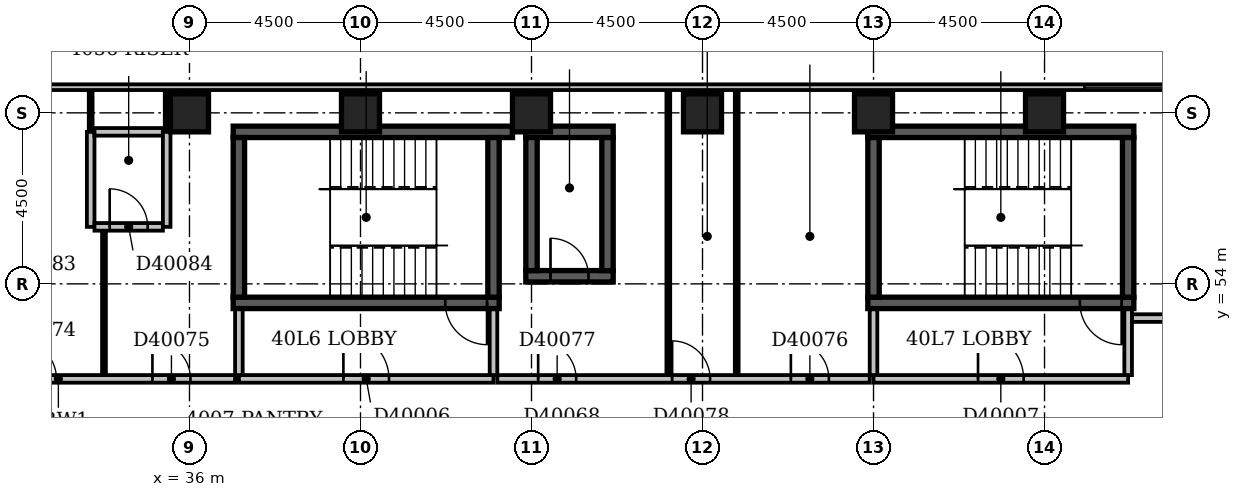
"""IFC4 building model, lengths in metres.
Left out: names, types, materials, properties, quantities, classifications, styles, units other than length and angle.
Written with IfcOpenShell. Run it as: python <this file> out.ifc"""

import sys

from ifc_helpers import new_model, si_unit, direction, frame, frame_2d, origin, origin_2d, place, context, subcontext, project, spatial, rectangle, extrude, element, fill, save


model = new_model("IFC4")
c1 = context("Model", 3, precision=1e-05, world=origin(), true_north=direction((0.0, 1.0)))
c2 = subcontext(c1, "Body", "Model", "MODEL_VIEW")
j1 = project(units=[si_unit("LENGTHUNIT", "METRE"), si_unit("PLANEANGLEUNIT", "RADIAN")], contexts=[c1])
p1 = place(None, origin())
s1 = spatial("IfcSite", under=j1, at=p1, CompositionType="ELEMENT")
p2 = place(p1, origin())
s2 = spatial("IfcBuilding", under=s1, at=p2, CompositionType="ELEMENT")
p3 = place(p2, frame((0.0, 0.0, 159.2)))
s3 = spatial("IfcBuildingStorey", under=s2, at=p3, CompositionType="ELEMENT", Elevation=159.2)
p4 = place(p3, frame((37.15, 53.5, -0.3), z_axis=(0.0, 0.0, 1.0), x_axis=(1.0, 0.0, 0.0)))
e1 = element("IfcWall", 1, at=p4, inside=s3, PredefinedType="SHEAR", context=c2, shape_type="SweptSolid", body=[
    extrude(rectangle(XDim=7.0, YDim=0.3, at=frame_2d((3.5, 0.0))), origin(), (0.0, 0.0, 1.0), 3.6),
])
p5 = place(p4, frame((5.58, 0.0, 0.3)))
e2 = element("IfcOpeningElement", 2, at=p5, cuts=e1, PredefinedType="OPENING", context=c2, shape_type="SweptSolid", body=[
    extrude(rectangle(XDim=1.1, YDim=2.1, at=frame_2d((0.55, 1.05))), frame((0.0, 0.162, 0.0), z_axis=(0.0, -1.0, 0.0), x_axis=(1.0, 0.0, 0.0)), (0.0, 0.0, 1.0), 0.324),
])
p6 = place(p3, frame((37.15, 58.0, -0.3), z_axis=(0.0, 0.0, 1.0), x_axis=(1.0, 0.0, 0.0)))
e3 = element("IfcWall", 3, at=p6, inside=s3, PredefinedType="SHEAR", context=c2, shape_type="SweptSolid", body=[
    extrude(rectangle(XDim=7.35, YDim=0.3, at=frame_2d((3.675, 0.0))), origin(), (0.0, 0.0, 1.0), 3.6),
])
for number, where, z_axis, x_axis in (
    (4, (37.3, 53.65, -0.3), (0.0, 0.0, 1.0), (0.0, 1.0, 0.0)),
    (5, (44.0, 53.65, -0.3), (0.0, 0.0, 1.0), (0.0, 1.0, 0.0)),
):
    element("IfcWall", number, at=place(p3, frame(where, z_axis=z_axis, x_axis=x_axis)), inside=s3, PredefinedType="SHEAR", context=c2, shape_type="SweptSolid", body=[
        extrude(rectangle(XDim=4.2, YDim=0.3, at=frame_2d((2.1, 0.0))), origin(), (0.0, 0.0, 1.0), 3.6),
    ])
p7 = place(p3, frame((44.85, 54.2, -0.3), z_axis=(0.0, 0.0, 1.0), x_axis=(1.0, 0.0, 0.0)))
e6 = element("IfcWall", 6, at=p7, inside=s3, PredefinedType="SHEAR", context=c2, shape_type="SweptSolid", body=[
    extrude(rectangle(XDim=2.3, YDim=0.3, at=frame_2d((1.15, 0.0))), origin(), (0.0, 0.0, 1.0), 3.6),
])
p8 = place(p7, frame((0.65, 0.0, 0.3)))
e7 = element("IfcOpeningElement", 7, at=p8, cuts=e6, PredefinedType="OPENING", context=c2, shape_type="SweptSolid", body=[
    extrude(rectangle(XDim=1.0, YDim=2.1, at=frame_2d((0.5, 1.05))), frame((0.0, 0.162, 0.0), z_axis=(0.0, -1.0, 0.0), x_axis=(1.0, 0.0, 0.0)), (0.0, 0.0, 1.0), 0.324),
])
p9 = place(p3, frame((44.85, 58.0, -0.3), z_axis=(0.0, 0.0, 1.0), x_axis=(1.0, 0.0, 0.0)))
e8 = element("IfcWall", 8, at=p9, inside=s3, PredefinedType="SHEAR", context=c2, shape_type="SweptSolid", body=[
    extrude(rectangle(XDim=2.3, YDim=0.3, at=frame_2d((1.15, 0.0))), origin(), (0.0, 0.0, 1.0), 3.6),
])
for number, where, z_axis, x_axis in (
    (9, (45.0, 54.35, -0.3), (0.0, 0.0, 1.0), (0.0, 1.0, 0.0)),
    (10, (47.0, 54.35, -0.3), (0.0, 0.0, 1.0), (0.0, 1.0, 0.0)),
):
    element("IfcWall", number, at=place(p3, frame(where, z_axis=z_axis, x_axis=x_axis)), inside=s3, PredefinedType="SHEAR", context=c2, shape_type="SweptSolid", body=[
        extrude(rectangle(XDim=3.5, YDim=0.3, at=frame_2d((1.75, 0.0))), origin(), (0.0, 0.0, 1.0), 3.6),
    ])
p10 = place(p3, frame((53.85, 53.5, -0.3), z_axis=(0.0, 0.0, 1.0), x_axis=(1.0, 0.0, 0.0)))
e11 = element("IfcWall", 11, at=p10, inside=s3, PredefinedType="SHEAR", context=c2, shape_type="SweptSolid", body=[
    extrude(rectangle(XDim=7.0, YDim=0.3, at=frame_2d((3.5, 0.0))), origin(), (0.0, 0.0, 1.0), 3.6),
])
p11 = place(p10, frame((5.58, 0.0, 0.3)))
e12 = element("IfcOpeningElement", 12, at=p11, cuts=e11, PredefinedType="OPENING", context=c2, shape_type="SweptSolid", body=[
    extrude(rectangle(XDim=1.1, YDim=2.1, at=frame_2d((0.55, 1.05))), frame((0.0, 0.162, 0.0), z_axis=(0.0, -1.0, 0.0), x_axis=(1.0, 0.0, 0.0)), (0.0, 0.0, 1.0), 0.324),
])
p12 = place(p3, frame((53.85, 58.0, -0.3), z_axis=(0.0, 0.0, 1.0), x_axis=(1.0, 0.0, 0.0)))
e13 = element("IfcWall", 13, at=p12, inside=s3, PredefinedType="SHEAR", context=c2, shape_type="SweptSolid", body=[
    extrude(rectangle(XDim=7.0, YDim=0.3, at=frame_2d((3.5, 0.0))), origin(), (0.0, 0.0, 1.0), 3.6),
])
for number, where, z_axis, x_axis in (
    (14, (54.0, 53.65, -0.3), (0.0, 0.0, 1.0), (0.0, 1.0, 0.0)),
    (15, (60.7, 53.65, -0.3), (0.0, 0.0, 1.0), (0.0, 1.0, 0.0)),
):
    element("IfcWall", number, at=place(p3, frame(where, z_axis=z_axis, x_axis=x_axis)), inside=s3, PredefinedType="SHEAR", context=c2, shape_type="SweptSolid", body=[
        extrude(rectangle(XDim=4.2, YDim=0.3, at=frame_2d((2.1, 0.0))), origin(), (0.0, 0.0, 1.0), 3.6),
    ])
for number, where, z_axis, x_axis in (
    (16, (36.0, 58.5, -0.3), (0.0, 0.0, 1.0), (1.0, 0.0, 0.0)),
    (17, (40.5, 58.5, -0.3), (0.0, 0.0, 1.0), (1.0, 0.0, 0.0)),
    (18, (45.0, 58.5, -0.3), (0.0, 0.0, 1.0), (1.0, 0.0, 0.0)),
    (19, (49.5, 58.5, -0.3), (0.0, 0.0, 1.0), (1.0, 0.0, 0.0)),
    (20, (54.0, 58.5, -0.3), (0.0, 0.0, 1.0), (1.0, 0.0, 0.0)),
    (21, (58.5, 58.5, -0.3), (0.0, 0.0, 1.0), (1.0, 0.0, 0.0)),
):
    element("IfcColumn", number, at=place(p3, frame(where, z_axis=z_axis, x_axis=x_axis)), inside=s3, PredefinedType="COLUMN", context=c2, shape_type="SweptSolid", body=[
        extrude(rectangle(XDim=1.0, YDim=1.0, at=origin_2d()), origin(), (0.0, 0.0, 1.0), 3.6),
    ])
p13 = place(p3, frame((68.1, 59.175, 0.0), z_axis=(0.0, 0.0, 1.0), x_axis=(-1.0, 0.0, 0.0)))
e22 = element("IfcWall", 22, at=p13, inside=s3, PredefinedType="STANDARD", context=c2, shape_type="SweptSolid", body=[
    extrude(rectangle(XDim=68.85, YDim=0.15, at=frame_2d((34.425, 0.0))), origin(), (0.0, 0.0, 1.0), 2.7),
])
p14 = place(p13, frame((1.65, 0.0, 0.6)))
e23 = element("IfcOpeningElement", 23, at=p14, cuts=e22, PredefinedType="OPENING", context=c2, shape_type="SweptSolid", body=[
    extrude(rectangle(XDim=2.4, YDim=1.8, at=frame_2d((1.2, 0.9))), frame((0.0, 0.087, 0.0), z_axis=(0.0, -1.0, 0.0), x_axis=(1.0, 0.0, 0.0)), (0.0, 0.0, 1.0), 0.174),
])
p15 = place(p13, frame((6.15, 0.0, 0.6)))
e24 = element("IfcOpeningElement", 24, at=p15, cuts=e22, PredefinedType="OPENING", context=c2, shape_type="SweptSolid", body=[
    extrude(rectangle(XDim=2.4, YDim=1.8, at=frame_2d((1.2, 0.9))), frame((0.0, 0.087, 0.0), z_axis=(0.0, -1.0, 0.0), x_axis=(1.0, 0.0, 0.0)), (0.0, 0.0, 1.0), 0.174),
])
p16 = place(p13, frame((37.685, 0.0, 0.6)))
e25 = element("IfcOpeningElement", 25, at=p16, cuts=e22, PredefinedType="OPENING", context=c2, shape_type="SweptSolid", body=[
    extrude(rectangle(XDim=1.5, YDim=1.8, at=frame_2d((0.75, 0.9))), frame((0.0, 0.087, 0.0), z_axis=(0.0, -1.0, 0.0), x_axis=(1.0, 0.0, 0.0)), (0.0, 0.0, 1.0), 0.174),
])
p17 = place(p3, frame((37.3, 51.5, 0.0), z_axis=(0.0, 0.0, 1.0), x_axis=(1.0, 0.0, 0.0)))
e26 = element("IfcWall", 26, at=p17, inside=s3, PredefinedType="PARTITIONING", context=c2, shape_type="SweptSolid", body=[
    extrude(rectangle(XDim=6.7, YDim=0.2, at=frame_2d((3.35, 0.0))), origin(), (0.0, 0.0, 1.0), 3.3),
])
p18 = place(p17, frame((2.75, 0.0, 0.0)))
e27 = element("IfcOpeningElement", 27, at=p18, cuts=e26, PredefinedType="OPENING", context=c2, shape_type="SweptSolid", body=[
    extrude(rectangle(XDim=1.2, YDim=2.1, at=frame_2d((0.6, 1.05))), frame((0.0, 0.112, 0.0), z_axis=(0.0, -1.0, 0.0), x_axis=(1.0, 0.0, 0.0)), (0.0, 0.0, 1.0), 0.224),
])
for number, where, z_axis, x_axis in (
    (28, (44.0, 51.6, 0.0), (0.0, 0.0, 1.0), (0.0, 1.0, 0.0)),
    (29, (37.3, 51.6, 0.0), (0.0, 0.0, 1.0), (0.0, 1.0, 0.0)),
):
    element("IfcWall", number, at=place(p3, frame(where, z_axis=z_axis, x_axis=x_axis)), inside=s3, PredefinedType="PARTITIONING", context=c2, shape_type="SweptSolid", body=[
        extrude(rectangle(XDim=1.73, YDim=0.2, at=frame_2d((0.865, 0.0))), origin(), (0.0, 0.0, 1.0), 3.3),
    ])
p19 = place(p3, frame((54.0, 51.5, 0.0), z_axis=(0.0, 0.0, 1.0), x_axis=(1.0, 0.0, 0.0)))
e30 = element("IfcWall", 30, at=p19, inside=s3, PredefinedType="PARTITIONING", context=c2, shape_type="SweptSolid", body=[
    extrude(rectangle(XDim=6.7, YDim=0.2, at=frame_2d((3.35, 0.0))), origin(), (0.0, 0.0, 1.0), 3.3),
])
p20 = place(p19, frame((2.75, 0.0, 0.0)))
e31 = element("IfcOpeningElement", 31, at=p20, cuts=e30, PredefinedType="OPENING", context=c2, shape_type="SweptSolid", body=[
    extrude(rectangle(XDim=1.2, YDim=2.1, at=frame_2d((0.6, 1.05))), frame((0.0, 0.112, 0.0), z_axis=(0.0, -1.0, 0.0), x_axis=(1.0, 0.0, 0.0)), (0.0, 0.0, 1.0), 0.224),
])
p21 = place(p3, frame((60.7, 51.6, 0.0), z_axis=(0.0, 0.0, 1.0), x_axis=(0.0, 1.0, 0.0)))
e32 = element("IfcWall", 32, at=p21, inside=s3, PredefinedType="PARTITIONING", context=c2, shape_type="SweptSolid", body=[
    extrude(rectangle(XDim=1.73, YDim=0.2, at=frame_2d((0.865, 0.0))), origin(), (0.0, 0.0, 1.0), 3.3),
])
p22 = place(p3, frame((54.0, 51.6, 0.0), z_axis=(0.0, 0.0, 1.0), x_axis=(0.0, 1.0, 0.0)))
e33 = element("IfcWall", 33, at=p22, inside=s3, PredefinedType="PARTITIONING", context=c2, shape_type="SweptSolid", body=[
    extrude(rectangle(XDim=1.73, YDim=0.2, at=frame_2d((0.865, 0.0))), origin(), (0.0, 0.0, 1.0), 2.6),
])
p23 = place(p3, frame((27.9, 51.5, 0.0), z_axis=(0.0, 0.0, 1.0), x_axis=(1.0, 0.0, 0.0)))
e34 = element("IfcWall", 34, at=p23, inside=s3, PredefinedType="PARTITIONING", context=c2, shape_type="SweptSolid", body=[
    extrude(rectangle(XDim=9.3, YDim=0.2, at=frame_2d((4.65, 0.0))), origin(), (0.0, 0.0, 1.0), 3.3),
])
p24 = place(p23, frame((0.675, 0.0, 0.0)))
e35 = element("IfcOpeningElement", 35, at=p24, cuts=e34, PredefinedType="OPENING", context=c2, shape_type="SweptSolid", body=[
    extrude(rectangle(XDim=0.9, YDim=2.1, at=frame_2d((0.45, 1.05))), frame((0.0, 0.112, 0.0), z_axis=(0.0, -1.0, 0.0), x_axis=(1.0, 0.0, 0.0)), (0.0, 0.0, 1.0), 0.224),
])
p25 = place(p23, frame((3.6, 0.0, 0.0)))
e36 = element("IfcOpeningElement", 36, at=p25, cuts=e34, PredefinedType="OPENING", context=c2, shape_type="SweptSolid", body=[
    extrude(rectangle(XDim=1.0, YDim=2.1, at=frame_2d((0.5, 1.05))), frame((0.0, 0.112, 0.0), z_axis=(0.0, -1.0, 0.0), x_axis=(1.0, 0.0, 0.0)), (0.0, 0.0, 1.0), 0.224),
])
p26 = place(p23, frame((7.125, 0.0, 0.0)))
e37 = element("IfcOpeningElement", 37, at=p26, cuts=e34, PredefinedType="OPENING", context=c2, shape_type="SweptSolid", body=[
    extrude(rectangle(XDim=1.0, YDim=2.1, at=frame_2d((0.5, 1.05))), frame((0.0, 0.112, 0.0), z_axis=(0.0, -1.0, 0.0), x_axis=(1.0, 0.0, 0.0)), (0.0, 0.0, 1.0), 0.224),
])
p27 = place(p3, frame((44.1, 51.5, 0.0), z_axis=(0.0, 0.0, 1.0), x_axis=(1.0, 0.0, 0.0)))
e38 = element("IfcWall", 38, at=p27, inside=s3, PredefinedType="PARTITIONING", context=c2, shape_type="SweptSolid", body=[
    extrude(rectangle(XDim=9.8, YDim=0.2, at=frame_2d((4.9, 0.0))), origin(), (0.0, 0.0, 1.0), 3.3),
])
p28 = place(p27, frame((7.725, 0.0, 0.0)))
e39 = element("IfcOpeningElement", 39, at=p28, cuts=e38, PredefinedType="OPENING", context=c2, shape_type="SweptSolid", body=[
    extrude(rectangle(XDim=1.0, YDim=2.1, at=frame_2d((0.5, 1.05))), frame((0.0, 0.112, 0.0), z_axis=(0.0, -1.0, 0.0), x_axis=(1.0, 0.0, 0.0)), (0.0, 0.0, 1.0), 0.224),
])
p29 = place(p27, frame((1.075, 0.0, 0.0)))
e40 = element("IfcOpeningElement", 40, at=p29, cuts=e38, PredefinedType="OPENING", context=c2, shape_type="SweptSolid", body=[
    extrude(rectangle(XDim=1.0, YDim=2.1, at=frame_2d((0.5, 1.05))), frame((0.0, 0.112, 0.0), z_axis=(0.0, -1.0, 0.0), x_axis=(1.0, 0.0, 0.0)), (0.0, 0.0, 1.0), 0.224),
])
p30 = place(p27, frame((4.6, 0.0, 0.0)))
e41 = element("IfcOpeningElement", 41, at=p30, cuts=e38, PredefinedType="OPENING", context=c2, shape_type="SweptSolid", body=[
    extrude(rectangle(XDim=1.0, YDim=2.1, at=frame_2d((0.5, 1.05))), frame((0.0, 0.112, 0.0), z_axis=(0.0, -1.0, 0.0), x_axis=(1.0, 0.0, 0.0)), (0.0, 0.0, 1.0), 0.224),
])
p31 = place(p3, frame((33.75, 51.6, 0.0), z_axis=(0.0, 0.0, 1.0), x_axis=(0.0, 1.0, 0.0)))
e42 = element("IfcWall", 42, at=p31, inside=s3, PredefinedType="PARTITIONING", context=c2, shape_type="SweptSolid", body=[
    extrude(rectangle(XDim=3.8, YDim=0.1, at=frame_2d((1.9, 0.0))), origin(), (0.0, 0.0, 1.0), 3.3),
])
for number, where, z_axis, x_axis in (
    (43, (48.6, 51.6, 0.0), (0.0, 0.0, 1.0), (0.0, 1.0, 0.0)),
    (44, (50.4, 51.6, 0.0), (0.0, 0.0, 1.0), (0.0, 1.0, 0.0)),
):
    element("IfcWall", number, at=place(p3, frame(where, z_axis=z_axis, x_axis=x_axis)), inside=s3, PredefinedType="PARTITIONING", context=c2, shape_type="SweptSolid", body=[
        extrude(rectangle(XDim=7.5, YDim=0.1, at=frame_2d((3.75, 0.0))), origin(), (0.0, 0.0, 1.0), 3.3),
    ])
p32 = place(p3, frame((60.8, 53.1, 0.0), z_axis=(0.0, 0.0, 1.0), x_axis=(1.0, 0.0, 0.0)))
e45 = element("IfcWall", 45, at=p32, inside=s3, PredefinedType="PARTITIONING", context=c2, shape_type="SweptSolid", body=[
    extrude(rectangle(XDim=7.3, YDim=0.2, at=frame_2d((3.65, 0.0))), origin(), (0.0, 0.0, 1.0), 3.3),
])
p33 = place(p32, frame((2.85, 0.0, 0.0)))
e46 = element("IfcOpeningElement", 46, at=p33, cuts=e45, PredefinedType="OPENING", context=c2, shape_type="SweptSolid", body=[
    extrude(rectangle(XDim=0.9, YDim=2.1, at=frame_2d((0.45, 1.05))), frame((0.0, 0.112, 0.0), z_axis=(0.0, -1.0, 0.0), x_axis=(1.0, 0.0, 0.0)), (0.0, 0.0, 1.0), 0.224),
])
p34 = place(p3, frame((33.4, 55.5, 0.0), z_axis=(0.0, 0.0, 1.0), x_axis=(0.0, 1.0, 0.0)))
e47 = element("IfcWall", 47, at=p34, inside=s3, PredefinedType="PARTITIONING", context=c2, shape_type="SweptSolid", body=[
    extrude(rectangle(XDim=2.5, YDim=0.2, at=frame_2d((1.25, 0.0))), origin(), (0.0, 0.0, 1.0), 3.3),
])
p35 = place(p3, frame((33.5, 55.5, 0.0), z_axis=(0.0, 0.0, 1.0), x_axis=(1.0, 0.0, 0.0)))
e48 = element("IfcWall", 48, at=p35, inside=s3, PredefinedType="PARTITIONING", context=c2, shape_type="SweptSolid", body=[
    extrude(rectangle(XDim=1.8, YDim=0.2, at=frame_2d((0.9, 0.0))), origin(), (0.0, 0.0, 1.0), 3.3),
])
p36 = place(p35, frame((0.4, 0.0, 0.0)))
e49 = element("IfcOpeningElement", 49, at=p36, cuts=e48, PredefinedType="OPENING", context=c2, shape_type="SweptSolid", body=[
    extrude(rectangle(XDim=1.0, YDim=2.1, at=frame_2d((0.5, 1.05))), frame((0.0, 0.112, 0.0), z_axis=(0.0, -1.0, 0.0), x_axis=(1.0, 0.0, 0.0)), (0.0, 0.0, 1.0), 0.224),
])
p37 = place(p3, frame((35.4, 55.5, 0.0), z_axis=(0.0, 0.0, 1.0), x_axis=(0.0, 1.0, 0.0)))
e50 = element("IfcWall", 50, at=p37, inside=s3, PredefinedType="PARTITIONING", context=c2, shape_type="SweptSolid", body=[
    extrude(rectangle(XDim=2.5, YDim=0.2, at=frame_2d((1.25, 0.0))), origin(), (0.0, 0.0, 1.0), 2.4),
])
p38 = place(p3, frame((33.4, 58.0, 0.0), z_axis=(0.0, 0.0, 1.0), x_axis=(0.0, 1.0, 0.0)))
e51 = element("IfcWall", 51, at=p38, inside=s3, PredefinedType="PARTITIONING", context=c2, shape_type="SweptSolid", body=[
    extrude(rectangle(XDim=1.1, YDim=0.1, at=frame_2d((0.55, 0.0))), origin(), (0.0, 0.0, 1.0), 3.3),
])
p39 = place(p3, frame((33.5, 58.0, 0.0), z_axis=(0.0, 0.0, 1.0), x_axis=(1.0, 0.0, 0.0)))
e52 = element("IfcWall", 52, at=p39, inside=s3, PredefinedType="PARTITIONING", context=c2, shape_type="SweptSolid", body=[
    extrude(rectangle(XDim=1.8, YDim=0.2, at=frame_2d((0.9, 0.0))), origin(), (0.0, 0.0, 1.0), 3.3),
])
p40 = place(p3, frame((35.4, 58.0, 0.0), z_axis=(0.0, 0.0, 1.0), x_axis=(0.0, 1.0, 0.0)))
e53 = element("IfcWall", 53, at=p40, inside=s3, PredefinedType="PARTITIONING", context=c2, shape_type="SweptSolid", body=[
    extrude(rectangle(XDim=1.1, YDim=0.1, at=frame_2d((0.55, 0.0))), origin(), (0.0, 0.0, 1.0), 2.4),
])
p41 = place(p15, origin())
e54 = element("IfcWindow", 54, at=p41, inside=s3, PartitioningType="SINGLE_PANEL", PredefinedType="WINDOW", context=c2, shape_type="SweptSolid", body=[
    extrude(rectangle(XDim=2.4, YDim=1.8, at=frame_2d((1.2, 0.9))), frame((0.0, 0.03, 0.0), z_axis=(0.0, -1.0, 0.0), x_axis=(1.0, 0.0, 0.0)), (0.0, 0.0, 1.0), 0.06),
])
fill(e24, e54)
p42 = place(p18, origin())
e55 = element("IfcDoor", 55, at=p42, inside=s3, OperationType="SINGLE_SWING_LEFT", PredefinedType="DOOR", context=c2, shape_type="SweptSolid", body=[
    extrude(rectangle(XDim=1.2, YDim=2.1, at=frame_2d((0.6, 1.05))), frame((0.0, 0.025, 0.0), z_axis=(0.0, -1.0, 0.0), x_axis=(1.0, 0.0, 0.0)), (0.0, 0.0, 1.0), 0.05),
])
fill(e27, e55)
p43 = place(p20, origin())
e56 = element("IfcDoor", 56, at=p43, inside=s3, OperationType="SINGLE_SWING_LEFT", PredefinedType="DOOR", context=c2, shape_type="SweptSolid", body=[
    extrude(rectangle(XDim=1.2, YDim=2.1, at=frame_2d((0.6, 1.05))), frame((0.0, 0.025, 0.0), z_axis=(0.0, -1.0, 0.0), x_axis=(1.0, 0.0, 0.0)), (0.0, 0.0, 1.0), 0.05),
])
fill(e31, e56)
p44 = place(p8, origin())
e57 = element("IfcDoor", 57, at=p44, inside=s3, OperationType="SINGLE_SWING_LEFT", PredefinedType="DOOR", context=c2, shape_type="SweptSolid", body=[
    extrude(rectangle(XDim=1.0, YDim=2.1, at=frame_2d((0.5, 1.05))), frame((0.0, 0.025, 0.0), z_axis=(0.0, -1.0, 0.0), x_axis=(1.0, 0.0, 0.0)), (0.0, 0.0, 1.0), 0.05),
])
fill(e7, e57)
p45 = place(p5, origin())
e58 = element("IfcDoor", 58, at=p45, inside=s3, OperationType="SINGLE_SWING_RIGHT", PredefinedType="DOOR", context=c2, shape_type="SweptSolid", body=[
    extrude(rectangle(XDim=1.1, YDim=2.1, at=frame_2d((0.55, 1.05))), frame((0.0, 0.025, 0.0), z_axis=(0.0, -1.0, 0.0), x_axis=(1.0, 0.0, 0.0)), (0.0, 0.0, 1.0), 0.05),
])
fill(e2, e58)
p46 = place(p11, origin())
e59 = element("IfcDoor", 59, at=p46, inside=s3, OperationType="SINGLE_SWING_RIGHT", PredefinedType="DOOR", context=c2, shape_type="SweptSolid", body=[
    extrude(rectangle(XDim=1.1, YDim=2.1, at=frame_2d((0.55, 1.05))), frame((0.0, 0.025, 0.0), z_axis=(0.0, -1.0, 0.0), x_axis=(1.0, 0.0, 0.0)), (0.0, 0.0, 1.0), 0.05),
])
fill(e12, e59)
p47 = place(p25, origin())
e60 = element("IfcDoor", 60, at=p47, inside=s3, OperationType="SINGLE_SWING_LEFT", PredefinedType="DOOR", context=c2, shape_type="SweptSolid", body=[
    extrude(rectangle(XDim=1.0, YDim=2.1, at=frame_2d((0.5, 1.05))), frame((0.0, 0.025, 0.0), z_axis=(0.0, -1.0, 0.0), x_axis=(1.0, 0.0, 0.0)), (0.0, 0.0, 1.0), 0.05),
])
fill(e36, e60)
p48 = place(p26, origin())
e61 = element("IfcDoor", 61, at=p48, inside=s3, OperationType="SINGLE_SWING_LEFT", PredefinedType="DOOR", context=c2, shape_type="SweptSolid", body=[
    extrude(rectangle(XDim=1.0, YDim=2.1, at=frame_2d((0.5, 1.05))), frame((0.0, 0.025, 0.0), z_axis=(0.0, -1.0, 0.0), x_axis=(1.0, 0.0, 0.0)), (0.0, 0.0, 1.0), 0.05),
])
fill(e37, e61)
p49 = place(p28, origin())
e62 = element("IfcDoor", 62, at=p49, inside=s3, OperationType="SINGLE_SWING_LEFT", PredefinedType="DOOR", context=c2, shape_type="SweptSolid", body=[
    extrude(rectangle(XDim=1.0, YDim=2.1, at=frame_2d((0.5, 1.05))), frame((0.0, 0.025, 0.0), z_axis=(0.0, -1.0, 0.0), x_axis=(1.0, 0.0, 0.0)), (0.0, 0.0, 1.0), 0.05),
])
fill(e39, e62)
p50 = place(p29, origin())
e63 = element("IfcDoor", 63, at=p50, inside=s3, OperationType="SINGLE_SWING_LEFT", PredefinedType="DOOR", context=c2, shape_type="SweptSolid", body=[
    extrude(rectangle(XDim=1.0, YDim=2.1, at=frame_2d((0.5, 1.05))), frame((0.0, 0.025, 0.0), z_axis=(0.0, -1.0, 0.0), x_axis=(1.0, 0.0, 0.0)), (0.0, 0.0, 1.0), 0.05),
])
fill(e40, e63)
p51 = place(p30, origin())
e64 = element("IfcDoor", 64, at=p51, inside=s3, OperationType="SINGLE_SWING_LEFT", PredefinedType="DOOR", context=c2, shape_type="SweptSolid", body=[
    extrude(rectangle(XDim=1.0, YDim=2.1, at=frame_2d((0.5, 1.05))), frame((0.0, 0.025, 0.0), z_axis=(0.0, -1.0, 0.0), x_axis=(1.0, 0.0, 0.0)), (0.0, 0.0, 1.0), 0.05),
])
fill(e41, e64)
p52 = place(p36, origin())
e65 = element("IfcDoor", 65, at=p52, inside=s3, OperationType="SINGLE_SWING_LEFT", PredefinedType="DOOR", context=c2, shape_type="SweptSolid", body=[
    extrude(rectangle(XDim=1.0, YDim=2.1, at=frame_2d((0.5, 1.05))), frame((0.0, 0.025, 0.0), z_axis=(0.0, -1.0, 0.0), x_axis=(1.0, 0.0, 0.0)), (0.0, 0.0, 1.0), 0.05),
])
fill(e49, e65)
save(model, sys.argv[1])
